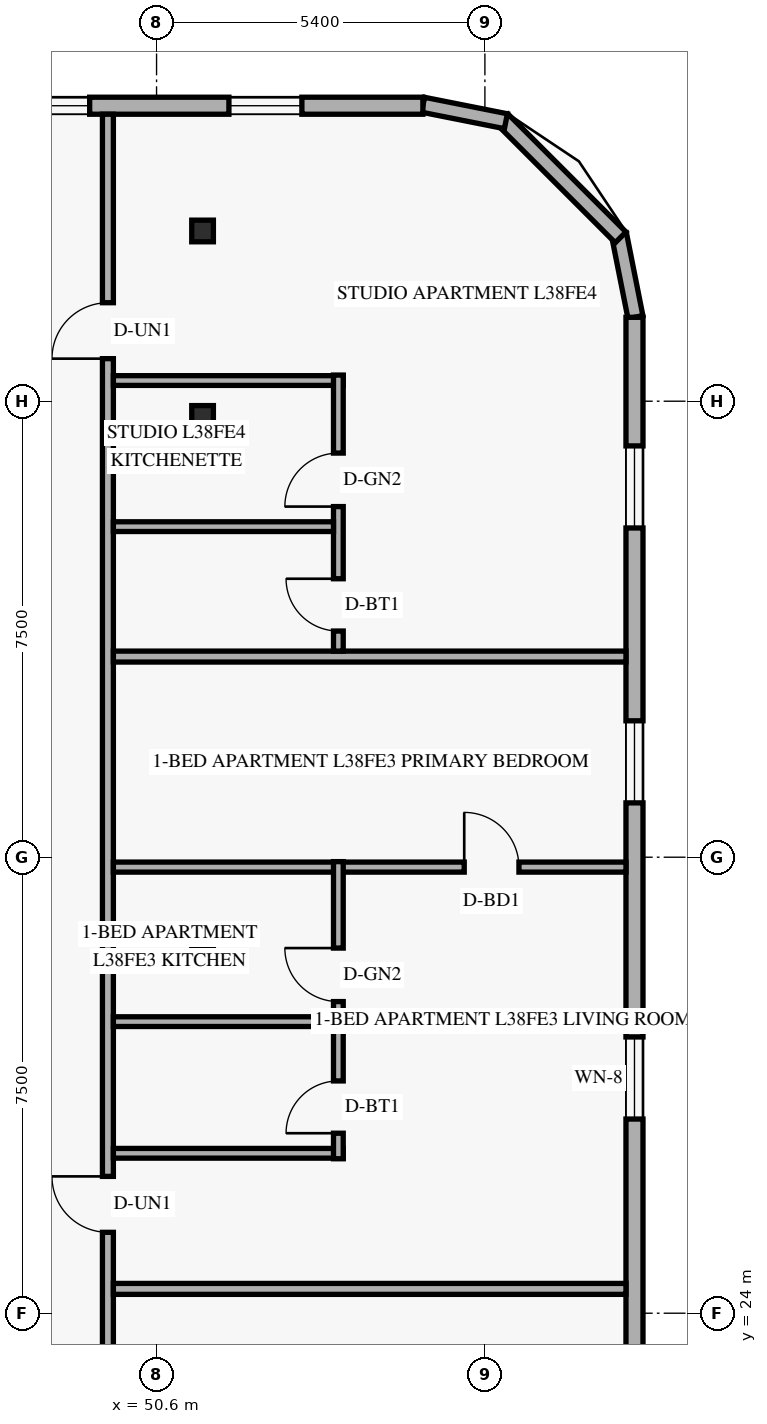
"""IFC4 building model, lengths in metres.
Left out: names, types, materials, properties, quantities, classifications, styles, units other than length and angle.
Written with IfcOpenShell. Run it as: python <this file> out.ifc"""

import sys

from ifc_helpers import new_model, si_unit, direction, frame, frame_2d, origin, origin_2d, place, context, subcontext, project, spatial, rectangle, hollow_rectangle, extrude, element, fill, save


model = new_model("IFC4")
c1 = context("Model", 3, precision=1e-05, world=origin(), true_north=direction((0.0, 1.0)))
c2 = subcontext(c1, "Body", "Model", "MODEL_VIEW")
j1 = project(units=[si_unit("LENGTHUNIT", "METRE"), si_unit("PLANEANGLEUNIT", "RADIAN")], contexts=[c1])
p1 = place(None, origin())
s1 = spatial("IfcSite", under=j1, at=p1, CompositionType="ELEMENT")
p2 = place(p1, origin())
s2 = spatial("IfcBuilding", under=s1, at=p2, CompositionType="ELEMENT")
p3 = place(p2, frame((0.0, 0.0, 148.2)))
s3 = spatial("IfcBuildingStorey", under=s2, at=p3, CompositionType="ELEMENT", Elevation=148.2)
for number, where, z_axis, x_axis in (
    (1, (51.252, 30.2, 0.0), (0.058, 0.0, 0.998), (0.0, 1.0, 0.0)),
    (2, (51.252, 38.75, 0.0), (0.058, 0.0, 0.998), (0.0, 1.0, 0.0)),
    (3, (51.252, 41.8, 0.0), (0.058, 0.0, 0.998), (0.0, 1.0, 0.0)),
):
    element("IfcColumn", number, at=place(p3, frame(where, z_axis=z_axis, x_axis=x_axis)), inside=s3, PredefinedType="COLUMN", context=c2, shape_type="SweptSolid", body=[
        extrude(hollow_rectangle(XDim=0.356, YDim=0.356, WallThickness=0.016, at=origin_2d()), origin(), (0.0, 0.0, 1.0), 3.606),
    ])
p4 = place(p3, frame((58.476, 40.384, 0.0), z_axis=(0.0, 0.0, 1.0), x_axis=(-0.19496651342, 0.980809899341, 0.0)))
e4 = element("IfcWall", 4, at=p4, inside=s3, PredefinedType="SOLIDWALL", context=c2, shape_type="SweptSolid", body=[
    extrude(rectangle(XDim=1.389, YDim=0.25, at=frame_2d((0.694, 0.0))), origin(), (0.0, 0.0, 1.0), 3.36),
])
p5 = place(p3, frame((58.232, 41.695, 0.0), z_axis=(0.0, 0.0, 1.0), x_axis=(-0.707106781187, 0.707106781187, 0.0)))
e5 = element("IfcWall", 5, at=p5, inside=s3, PredefinedType="SOLIDWALL", context=c2, shape_type="SweptSolid", body=[
    extrude(rectangle(XDim=2.739, YDim=0.25, at=frame_2d((1.37, 0.0))), origin(), (0.0, 0.0, 1.0), 3.36),
])
p6 = place(p3, frame((56.345, 43.605, 0.0), z_axis=(0.0, 0.0, 1.0), x_axis=(-0.980809899341, 0.19496651342, 0.0)))
e6 = element("IfcWall", 6, at=p6, inside=s3, PredefinedType="SOLIDWALL", context=c2, shape_type="SweptSolid", body=[
    extrude(rectangle(XDim=1.389, YDim=0.25, at=frame_2d((0.694, 0.0))), origin(), (0.0, 0.0, 1.0), 3.36),
])
p7 = place(p3, frame((58.46, 7.62, 0.0), z_axis=(0.0, 0.0, 1.0), x_axis=(0.0, 1.0, 0.0)))
e7 = element("IfcWall", 7, at=p7, inside=s3, PredefinedType="SOLIDWALL", context=c2, shape_type="SweptSolid", body=[
    extrude(rectangle(XDim=32.76, YDim=0.28, at=frame_2d((16.38, 0.0))), origin(), (0.0, 0.0, 1.0), 3.36),
])
p8 = place(p7, frame((2.315, 0.0, 0.85)))
e8 = element("IfcOpeningElement", 8, at=p8, cuts=e7, PredefinedType="OPENING", context=c2, shape_type="SweptSolid", body=[
    extrude(rectangle(XDim=1.35, YDim=1.55, at=frame_2d((0.675, 0.775))), frame((0.0, 0.15, 0.0), z_axis=(0.0, -1.0, 0.0), x_axis=(1.0, 0.0, 0.0)), (0.0, 0.0, 1.0), 0.3),
])
p9 = place(p7, frame((8.25, 0.0, 0.85)))
e9 = element("IfcOpeningElement", 9, at=p9, cuts=e7, PredefinedType="OPENING", context=c2, shape_type="SweptSolid", body=[
    extrude(rectangle(XDim=1.35, YDim=1.55, at=frame_2d((0.675, 0.775))), frame((0.0, 0.15, 0.0), z_axis=(0.0, -1.0, 0.0), x_axis=(1.0, 0.0, 0.0)), (0.0, 0.0, 1.0), 0.3),
])
p10 = place(p7, frame((13.65, 0.0, 0.85)))
e10 = element("IfcOpeningElement", 10, at=p10, cuts=e7, PredefinedType="OPENING", context=c2, shape_type="SweptSolid", body=[
    extrude(rectangle(XDim=1.35, YDim=1.55, at=frame_2d((0.675, 0.775))), frame((0.0, 0.15, 0.0), z_axis=(0.0, -1.0, 0.0), x_axis=(1.0, 0.0, 0.0)), (0.0, 0.0, 1.0), 0.3),
])
p11 = place(p7, frame((19.574, 0.0, 0.85)))
e11 = element("IfcOpeningElement", 11, at=p11, cuts=e7, PredefinedType="OPENING", context=c2, shape_type="SweptSolid", body=[
    extrude(rectangle(XDim=1.35, YDim=1.55, at=frame_2d((0.675, 0.775))), frame((0.0, 0.15, 0.0), z_axis=(0.0, -1.0, 0.0), x_axis=(1.0, 0.0, 0.0)), (0.0, 0.0, 1.0), 0.3),
])
p12 = place(p7, frame((24.774, 0.0, 0.85)))
e12 = element("IfcOpeningElement", 12, at=p12, cuts=e7, PredefinedType="OPENING", context=c2, shape_type="SweptSolid", body=[
    extrude(rectangle(XDim=1.35, YDim=1.55, at=frame_2d((0.675, 0.775))), frame((0.0, 0.15, 0.0), z_axis=(0.0, -1.0, 0.0), x_axis=(1.0, 0.0, 0.0)), (0.0, 0.0, 1.0), 0.3),
])
p13 = place(p7, frame((29.295, 0.0, 0.85)))
e13 = element("IfcOpeningElement", 13, at=p13, cuts=e7, PredefinedType="OPENING", context=c2, shape_type="SweptSolid", body=[
    extrude(rectangle(XDim=1.35, YDim=1.55, at=frame_2d((0.675, 0.775))), frame((0.0, 0.15, 0.0), z_axis=(0.0, -1.0, 0.0), x_axis=(1.0, 0.0, 0.0)), (0.0, 0.0, 1.0), 0.3),
])
p14 = place(p3, frame((54.98, 43.86, 0.0), z_axis=(0.0, 0.0, 1.0), x_axis=(-1.0, 0.0, 0.0)))
e14 = element("IfcWall", 14, at=p14, inside=s3, PredefinedType="SOLIDWALL", context=c2, shape_type="SweptSolid", body=[
    extrude(rectangle(XDim=33.76, YDim=0.28, at=frame_2d((16.88, 0.0))), origin(), (0.0, 0.0, 1.0), 3.36),
])
p15 = place(p14, frame((28.355, 0.0, 0.85)))
e15 = element("IfcOpeningElement", 15, at=p15, cuts=e14, PredefinedType="OPENING", context=c2, shape_type="SweptSolid", body=[
    extrude(rectangle(XDim=1.2, YDim=1.5, at=frame_2d((0.6, 0.75))), frame((0.0, 0.15, 0.0), z_axis=(0.0, -1.0, 0.0), x_axis=(1.0, 0.0, 0.0)), (0.0, 0.0, 1.0), 0.3),
])
p16 = place(p14, frame((21.47, 0.0, 0.85)))
e16 = element("IfcOpeningElement", 16, at=p16, cuts=e14, PredefinedType="OPENING", context=c2, shape_type="SweptSolid", body=[
    extrude(rectangle(XDim=1.2, YDim=1.5, at=frame_2d((0.6, 0.75))), frame((0.0, 0.15, 0.0), z_axis=(0.0, -1.0, 0.0), x_axis=(1.0, 0.0, 0.0)), (0.0, 0.0, 1.0), 0.3),
])
p17 = place(p14, frame((15.165, 0.0, 0.85)))
e17 = element("IfcOpeningElement", 17, at=p17, cuts=e14, PredefinedType="OPENING", context=c2, shape_type="SweptSolid", body=[
    extrude(rectangle(XDim=1.2, YDim=1.5, at=frame_2d((0.6, 0.75))), frame((0.0, 0.15, 0.0), z_axis=(0.0, -1.0, 0.0), x_axis=(1.0, 0.0, 0.0)), (0.0, 0.0, 1.0), 0.3),
])
p18 = place(p14, frame((8.875, 0.0, 0.85)))
e18 = element("IfcOpeningElement", 18, at=p18, cuts=e14, PredefinedType="OPENING", context=c2, shape_type="SweptSolid", body=[
    extrude(rectangle(XDim=1.2, YDim=1.5, at=frame_2d((0.6, 0.75))), frame((0.0, 0.15, 0.0), z_axis=(0.0, -1.0, 0.0), x_axis=(1.0, 0.0, 0.0)), (0.0, 0.0, 1.0), 0.3),
])
p19 = place(p14, frame((5.48, 0.0, 0.85)))
e19 = element("IfcOpeningElement", 19, at=p19, cuts=e14, PredefinedType="OPENING", context=c2, shape_type="SweptSolid", body=[
    extrude(rectangle(XDim=1.2, YDim=1.5, at=frame_2d((0.6, 0.75))), frame((0.0, 0.15, 0.0), z_axis=(0.0, -1.0, 0.0), x_axis=(1.0, 0.0, 0.0)), (0.0, 0.0, 1.0), 0.3),
])
p20 = place(p14, frame((1.99, 0.0, 0.85)))
e20 = element("IfcOpeningElement", 20, at=p20, cuts=e14, PredefinedType="OPENING", context=c2, shape_type="SweptSolid", body=[
    extrude(rectangle(XDim=1.2, YDim=1.5, at=frame_2d((0.6, 0.75))), frame((0.0, 0.15, 0.0), z_axis=(0.0, -1.0, 0.0), x_axis=(1.0, 0.0, 0.0)), (0.0, 0.0, 1.0), 0.3),
])
p21 = place(p3, frame((49.8, 4.28, 0.0), z_axis=(0.0, 0.0, 1.0), x_axis=(0.0, 1.0, 0.0)))
e21 = element("IfcWall", 21, at=p21, inside=s3, PredefinedType="STANDARD", context=c2, shape_type="SweptSolid", body=[
    extrude(rectangle(XDim=39.44, YDim=0.18, at=frame_2d((19.72, 0.0))), origin(), (0.0, 0.0, 1.0), 2.73),
])
p22 = place(p21, frame((3.38, 0.0, 0.0)))
e22 = element("IfcOpeningElement", 22, at=p22, cuts=e21, PredefinedType="OPENING", context=c2, shape_type="SweptSolid", body=[
    extrude(rectangle(XDim=0.92, YDim=2.15, at=frame_2d((0.46, 1.075))), frame((0.0, 0.1, 0.0), z_axis=(0.0, -1.0, 0.0), x_axis=(1.0, 0.0, 0.0)), (0.0, 0.0, 1.0), 0.2),
])
p23 = place(p21, frame((14.32, 0.0, 0.0)))
e23 = element("IfcOpeningElement", 23, at=p23, cuts=e21, PredefinedType="OPENING", context=c2, shape_type="SweptSolid", body=[
    extrude(rectangle(XDim=0.92, YDim=2.15, at=frame_2d((0.46, 1.075))), frame((0.0, 0.1, 0.0), z_axis=(0.0, -1.0, 0.0), x_axis=(1.0, 0.0, 0.0)), (0.0, 0.0, 1.0), 0.2),
])
p24 = place(p21, frame((21.05, 0.0, 0.0)))
e24 = element("IfcOpeningElement", 24, at=p24, cuts=e21, PredefinedType="OPENING", context=c2, shape_type="SweptSolid", body=[
    extrude(rectangle(XDim=0.92, YDim=2.15, at=frame_2d((0.46, 1.075))), frame((0.0, 0.1, 0.0), z_axis=(0.0, -1.0, 0.0), x_axis=(1.0, 0.0, 0.0)), (0.0, 0.0, 1.0), 0.2),
])
p25 = place(p21, frame((35.42, 0.0, 0.0)))
e25 = element("IfcOpeningElement", 25, at=p25, cuts=e21, PredefinedType="OPENING", context=c2, shape_type="SweptSolid", body=[
    extrude(rectangle(XDim=0.92, YDim=2.15, at=frame_2d((0.46, 1.075))), frame((0.0, 0.1, 0.0), z_axis=(0.0, -1.0, 0.0), x_axis=(1.0, 0.0, 0.0)), (0.0, 0.0, 1.0), 0.2),
])
p26 = place(p3, frame((49.89, 24.4, 0.0), z_axis=(0.0, 0.0, 1.0), x_axis=(1.0, 0.0, 0.0)))
e26 = element("IfcWall", 26, at=p26, inside=s3, PredefinedType="PARTITIONING", context=c2, shape_type="SweptSolid", body=[
    extrude(rectangle(XDim=8.43, YDim=0.18, at=frame_2d((4.215, 0.0))), origin(), (0.0, 0.0, 1.0), 2.879),
])
p27 = place(p3, frame((49.89, 31.337, 0.0), z_axis=(0.0, 0.0, 1.0), x_axis=(1.0, 0.0, 0.0)))
e27 = element("IfcWall", 27, at=p27, inside=s3, PredefinedType="PARTITIONING", context=c2, shape_type="SweptSolid", body=[
    extrude(rectangle(XDim=8.43, YDim=0.165, at=frame_2d((4.215, 0.0))), origin(), (0.0, 0.0, 1.0), 2.879),
])
p28 = place(p27, frame((5.77, 0.0, 0.0)))
e28 = element("IfcOpeningElement", 28, at=p28, cuts=e27, PredefinedType="OPENING", context=c2, shape_type="SweptSolid", body=[
    extrude(rectangle(XDim=0.9, YDim=2.14, at=frame_2d((0.45, 1.07))), frame((0.0, 0.093, 0.0), z_axis=(0.0, -1.0, 0.0), x_axis=(1.0, 0.0, 0.0)), (0.0, 0.0, 1.0), 0.185),
])
p29 = place(p3, frame((49.89, 26.63, 0.0), z_axis=(0.0, 0.0, 1.0), x_axis=(1.0, 0.0, 0.0)))
e29 = element("IfcWall", 29, at=p29, inside=s3, PredefinedType="PLUMBINGWALL", context=c2, shape_type="SweptSolid", body=[
    extrude(rectangle(XDim=3.78, YDim=0.16, at=frame_2d((1.89, 0.0))), origin(), (0.0, 0.0, 1.0), 2.879),
])
p30 = place(p3, frame((53.59, 26.54, 0.0), z_axis=(0.0, 0.0, 1.0), x_axis=(0.0, 1.0, 0.0)))
e30 = element("IfcWall", 30, at=p30, inside=s3, PredefinedType="PLUMBINGWALL", context=c2, shape_type="SweptSolid", body=[
    extrude(rectangle(XDim=4.887, YDim=0.16, at=frame_2d((2.444, 0.0))), origin(), (0.0, 0.0, 1.0), 3.36),
])
p31 = place(p30, frame((0.42, 0.0, 0.0)))
e31 = element("IfcOpeningElement", 31, at=p31, cuts=e30, PredefinedType="OPENING", context=c2, shape_type="SweptSolid", body=[
    extrude(rectangle(XDim=0.86, YDim=2.12, at=frame_2d((0.43, 1.06))), frame((0.0, 0.09, 0.0), z_axis=(0.0, -1.0, 0.0), x_axis=(1.0, 0.0, 0.0)), (0.0, 0.0, 1.0), 0.18),
])
p32 = place(p30, frame((2.585, 0.0, 0.0)))
e32 = element("IfcOpeningElement", 32, at=p32, cuts=e30, PredefinedType="OPENING", context=c2, shape_type="SweptSolid", body=[
    extrude(rectangle(XDim=0.88, YDim=2.12, at=frame_2d((0.44, 1.06))), frame((0.0, 0.09, 0.0), z_axis=(0.0, -1.0, 0.0), x_axis=(1.0, 0.0, 0.0)), (0.0, 0.0, 1.0), 0.18),
])
p33 = place(p3, frame((49.89, 28.796, 0.0), z_axis=(0.0, 0.0, 1.0), x_axis=(1.0, 0.0, 0.0)))
e33 = element("IfcWall", 33, at=p33, inside=s3, PredefinedType="PLUMBINGWALL", context=c2, shape_type="SweptSolid", body=[
    extrude(rectangle(XDim=3.62, YDim=0.16, at=frame_2d((1.81, 0.0))), origin(), (0.0, 0.0, 1.0), 2.879),
])
p34 = place(p3, frame((49.89, 34.8, 0.0), z_axis=(0.0, 0.0, 1.0), x_axis=(1.0, 0.0, 0.0)))
e34 = element("IfcWall", 34, at=p34, inside=s3, PredefinedType="PARTITIONING", context=c2, shape_type="SweptSolid", body=[
    extrude(rectangle(XDim=8.43, YDim=0.18, at=frame_2d((4.215, 0.0))), origin(), (0.0, 0.0, 1.0), 2.879),
])
p35 = place(p3, frame((49.89, 39.34, 0.0), z_axis=(0.0, 0.0, 1.0), x_axis=(1.0, 0.0, 0.0)))
e35 = element("IfcWall", 35, at=p35, inside=s3, PredefinedType="PLUMBINGWALL", context=c2, shape_type="SweptSolid", body=[
    extrude(rectangle(XDim=3.78, YDim=0.16, at=frame_2d((1.89, 0.0))), origin(), (0.0, 0.0, 1.0), 2.879),
])
p36 = place(p3, frame((53.59, 34.89, 0.0), z_axis=(0.0, 0.0, 1.0), x_axis=(0.0, 1.0, 0.0)))
e36 = element("IfcWall", 36, at=p36, inside=s3, PredefinedType="PLUMBINGWALL", context=c2, shape_type="SweptSolid", body=[
    extrude(rectangle(XDim=4.54, YDim=0.16, at=frame_2d((2.27, 0.0))), origin(), (0.0, 0.0, 1.0), 3.36),
])
p37 = place(p36, frame((0.33, 0.0, 0.0)))
e37 = element("IfcOpeningElement", 37, at=p37, cuts=e36, PredefinedType="OPENING", context=c2, shape_type="SweptSolid", body=[
    extrude(rectangle(XDim=0.86, YDim=2.12, at=frame_2d((0.43, 1.06))), frame((0.0, 0.09, 0.0), z_axis=(0.0, -1.0, 0.0), x_axis=(1.0, 0.0, 0.0)), (0.0, 0.0, 1.0), 0.18),
])
p38 = place(p36, frame((2.377, 0.0, 0.0)))
e38 = element("IfcOpeningElement", 38, at=p38, cuts=e36, PredefinedType="OPENING", context=c2, shape_type="SweptSolid", body=[
    extrude(rectangle(XDim=0.88, YDim=2.12, at=frame_2d((0.44, 1.06))), frame((0.0, 0.09, 0.0), z_axis=(0.0, -1.0, 0.0), x_axis=(1.0, 0.0, 0.0)), (0.0, 0.0, 1.0), 0.18),
])
p39 = place(p3, frame((49.89, 36.937, 0.0), z_axis=(0.0, 0.0, 1.0), x_axis=(1.0, 0.0, 0.0)))
e39 = element("IfcWall", 39, at=p39, inside=s3, PredefinedType="PLUMBINGWALL", context=c2, shape_type="SweptSolid", body=[
    extrude(rectangle(XDim=3.62, YDim=0.16, at=frame_2d((1.81, 0.0))), origin(), (0.0, 0.0, 1.0), 2.879),
])
p40 = place(p11, origin())
e40 = element("IfcWindow", 40, at=p40, inside=s3, PartitioningType="SINGLE_PANEL", PredefinedType="WINDOW", context=c2, shape_type="SweptSolid", body=[
    extrude(rectangle(XDim=1.35, YDim=1.55, at=frame_2d((0.675, 0.775))), frame((0.0, 0.03, 0.0), z_axis=(0.0, -1.0, 0.0), x_axis=(1.0, 0.0, 0.0)), (0.0, 0.0, 1.0), 0.06),
])
fill(e11, e40)
p41 = place(p12, origin())
e41 = element("IfcWindow", 41, at=p41, inside=s3, PartitioningType="SINGLE_PANEL", PredefinedType="WINDOW", context=c2, shape_type="SweptSolid", body=[
    extrude(rectangle(XDim=1.35, YDim=1.55, at=frame_2d((0.675, 0.775))), frame((0.0, 0.03, 0.0), z_axis=(0.0, -1.0, 0.0), x_axis=(1.0, 0.0, 0.0)), (0.0, 0.0, 1.0), 0.06),
])
fill(e12, e41)
p42 = place(p13, origin())
e42 = element("IfcWindow", 42, at=p42, inside=s3, PartitioningType="SINGLE_PANEL", PredefinedType="WINDOW", context=c2, shape_type="SweptSolid", body=[
    extrude(rectangle(XDim=1.35, YDim=1.55, at=frame_2d((0.675, 0.775))), frame((0.0, 0.03, 0.0), z_axis=(0.0, -1.0, 0.0), x_axis=(1.0, 0.0, 0.0)), (0.0, 0.0, 1.0), 0.06),
])
fill(e13, e42)
p43 = place(p19, origin())
e43 = element("IfcWindow", 43, at=p43, inside=s3, PartitioningType="SINGLE_PANEL", PredefinedType="WINDOW", context=c2, shape_type="SweptSolid", body=[
    extrude(rectangle(XDim=1.2, YDim=1.5, at=frame_2d((0.6, 0.75))), frame((0.0, 0.03, 0.0), z_axis=(0.0, -1.0, 0.0), x_axis=(1.0, 0.0, 0.0)), (0.0, 0.0, 1.0), 0.06),
])
fill(e19, e43)
p44 = place(p20, origin())
e44 = element("IfcWindow", 44, at=p44, inside=s3, PartitioningType="SINGLE_PANEL", PredefinedType="WINDOW", context=c2, shape_type="SweptSolid", body=[
    extrude(rectangle(XDim=1.2, YDim=1.5, at=frame_2d((0.6, 0.75))), frame((0.0, 0.03, 0.0), z_axis=(0.0, -1.0, 0.0), x_axis=(1.0, 0.0, 0.0)), (0.0, 0.0, 1.0), 0.06),
])
fill(e20, e44)
p45 = place(p24, origin())
e45 = element("IfcDoor", 45, at=p45, inside=s3, OperationType="SINGLE_SWING_RIGHT", PredefinedType="DOOR", context=c2, shape_type="SweptSolid", body=[
    extrude(rectangle(XDim=0.92, YDim=2.15, at=frame_2d((0.46, 1.075))), frame((0.0, 0.025, 0.0), z_axis=(0.0, -1.0, 0.0), x_axis=(1.0, 0.0, 0.0)), (0.0, 0.0, 1.0), 0.05),
])
fill(e24, e45)
p46 = place(p31, origin())
e46 = element("IfcDoor", 46, at=p46, inside=s3, OperationType="SINGLE_SWING_LEFT", PredefinedType="DOOR", context=c2, shape_type="SweptSolid", body=[
    extrude(rectangle(XDim=0.86, YDim=2.12, at=frame_2d((0.43, 1.06))), frame((0.0, 0.025, 0.0), z_axis=(0.0, -1.0, 0.0), x_axis=(1.0, 0.0, 0.0)), (0.0, 0.0, 1.0), 0.05),
])
fill(e31, e46)
p47 = place(p32, origin())
e47 = element("IfcDoor", 47, at=p47, inside=s3, OperationType="SINGLE_SWING_RIGHT", PredefinedType="DOOR", context=c2, shape_type="SweptSolid", body=[
    extrude(rectangle(XDim=0.88, YDim=2.12, at=frame_2d((0.44, 1.06))), frame((0.0, 0.025, 0.0), z_axis=(0.0, -1.0, 0.0), x_axis=(1.0, 0.0, 0.0)), (0.0, 0.0, 1.0), 0.05),
])
fill(e32, e47)
p48 = place(p28, origin())
e48 = element("IfcDoor", 48, at=p48, inside=s3, OperationType="SINGLE_SWING_LEFT", PredefinedType="DOOR", context=c2, shape_type="SweptSolid", body=[
    extrude(rectangle(XDim=0.9, YDim=2.14, at=frame_2d((0.45, 1.07))), frame((0.0, 0.025, 0.0), z_axis=(0.0, -1.0, 0.0), x_axis=(1.0, 0.0, 0.0)), (0.0, 0.0, 1.0), 0.05),
])
fill(e28, e48)
p49 = place(p25, origin())
e49 = element("IfcDoor", 49, at=p49, inside=s3, OperationType="SINGLE_SWING_LEFT", PredefinedType="DOOR", context=c2, shape_type="SweptSolid", body=[
    extrude(rectangle(XDim=0.92, YDim=2.15, at=frame_2d((0.46, 1.075))), frame((0.0, 0.025, 0.0), z_axis=(0.0, -1.0, 0.0), x_axis=(1.0, 0.0, 0.0)), (0.0, 0.0, 1.0), 0.05),
])
fill(e25, e49)
p50 = place(p37, origin())
e50 = element("IfcDoor", 50, at=p50, inside=s3, OperationType="SINGLE_SWING_RIGHT", PredefinedType="DOOR", context=c2, shape_type="SweptSolid", body=[
    extrude(rectangle(XDim=0.86, YDim=2.12, at=frame_2d((0.43, 1.06))), frame((0.0, 0.025, 0.0), z_axis=(0.0, -1.0, 0.0), x_axis=(1.0, 0.0, 0.0)), (0.0, 0.0, 1.0), 0.05),
])
fill(e37, e50)
p51 = place(p38, origin())
e51 = element("IfcDoor", 51, at=p51, inside=s3, OperationType="SINGLE_SWING_LEFT", PredefinedType="DOOR", context=c2, shape_type="SweptSolid", body=[
    extrude(rectangle(XDim=0.88, YDim=2.12, at=frame_2d((0.44, 1.06))), frame((0.0, 0.025, 0.0), z_axis=(0.0, -1.0, 0.0), x_axis=(1.0, 0.0, 0.0)), (0.0, 0.0, 1.0), 0.05),
])
fill(e38, e51)
save(model, sys.argv[1])
